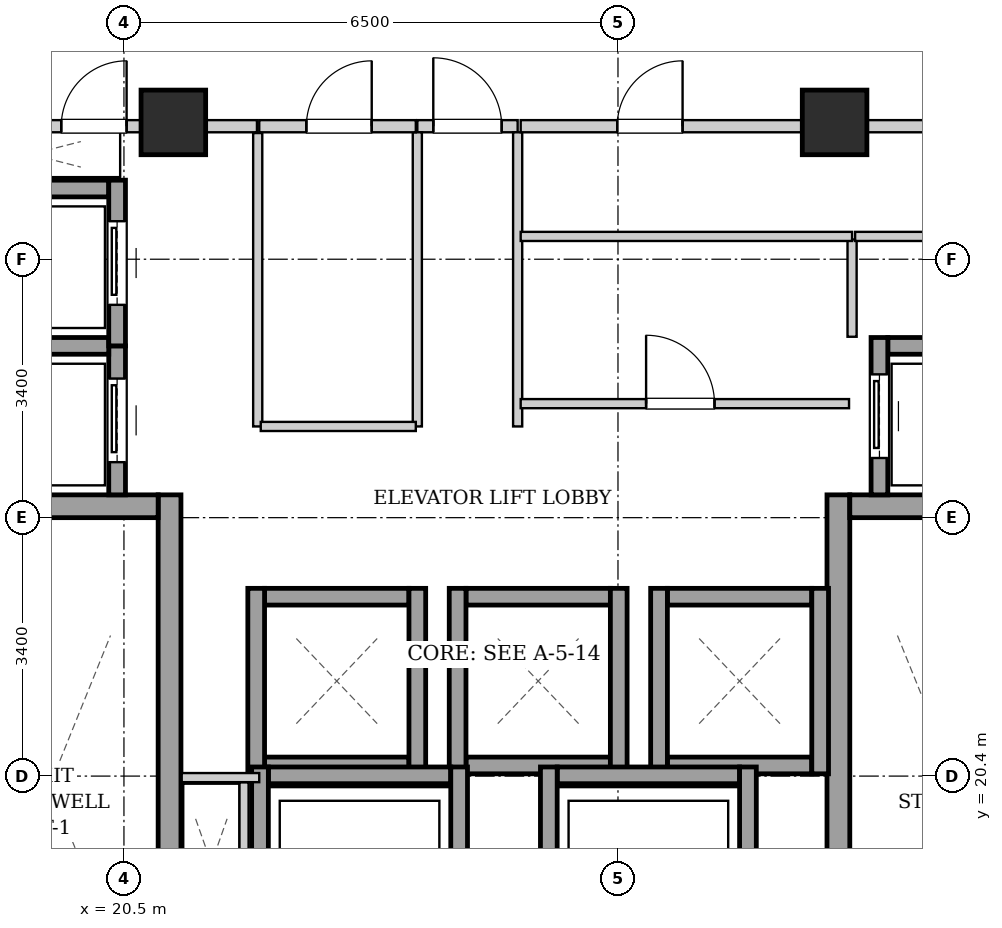
"""IFC4 building model, lengths in metres.
Left out: names, types, materials, properties, quantities, classifications, styles, units other than length and angle.
Written with IfcOpenShell. Run it as: python <this file> out.ifc"""

import sys

from ifc_helpers import new_model, si_unit, direction, frame, frame_2d, origin, origin_2d, place, context, subcontext, project, spatial, rectangle, extrude, element, fill, save


model = new_model("IFC4")
c1 = context("Model", 3, precision=1e-05, world=origin(), true_north=direction((0.0, 1.0)))
c2 = subcontext(c1, "Body", "Model", "MODEL_VIEW")
j1 = project(units=[si_unit("LENGTHUNIT", "METRE"), si_unit("PLANEANGLEUNIT", "RADIAN")], contexts=[c1])
p1 = place(None, origin())
s1 = spatial("IfcSite", under=j1, at=p1, CompositionType="ELEMENT")
p2 = place(p1, origin())
s2 = spatial("IfcBuilding", under=s1, at=p2, CompositionType="ELEMENT")
p3 = place(p2, frame((0.0, 0.0, 177.7)))
s3 = spatial("IfcBuildingStorey", under=s2, at=p3, CompositionType="ELEMENT", Elevation=177.7)
for number, where, z_axis, x_axis in (
    (1, (21.15, 29.0, 0.0), (0.0, 0.0, 1.0), (1.0, 0.0, 0.0)),
    (2, (29.85, 29.0, 0.0), (0.0, 0.0, 1.0), (1.0, 0.0, 0.0)),
):
    element("IfcColumn", number, at=place(p3, frame(where, z_axis=z_axis, x_axis=x_axis)), inside=s3, PredefinedType="COLUMN", context=c2, shape_type="SweptSolid", body=[
        extrude(rectangle(XDim=0.85, YDim=0.85, at=origin_2d()), origin(), (0.0, 0.0, 1.0), 3.3),
    ])
p4 = place(p3, frame((21.1, 15.1, 0.0), z_axis=(0.0, 0.0, 1.0), x_axis=(0.0, 1.0, 0.0)))
e3 = element("IfcWall", 3, at=p4, inside=s3, PredefinedType="SHEAR", context=c2, shape_type="SweptSolid", body=[
    extrude(rectangle(XDim=9.0, YDim=0.3, at=frame_2d((4.5, 0.0))), origin(), (0.0, 0.0, 1.0), 3.04),
])
p5 = place(p3, frame((18.1, 23.95, 0.0), z_axis=(0.0, 0.0, 1.0), x_axis=(1.0, 0.0, 0.0)))
e4 = element("IfcWall", 4, at=p5, inside=s3, PredefinedType="SHEAR", context=c2, shape_type="SweptSolid", body=[
    extrude(rectangle(XDim=2.85, YDim=0.3, at=frame_2d((1.425, 0.0))), origin(), (0.0, 0.0, 1.0), 3.04),
])
p6 = place(p3, frame((29.9, 15.1, 0.0), z_axis=(0.0, 0.0, 1.0), x_axis=(0.0, 1.0, 0.0)))
e5 = element("IfcWall", 5, at=p6, inside=s3, PredefinedType="SHEAR", context=c2, shape_type="SweptSolid", body=[
    extrude(rectangle(XDim=9.0, YDim=0.3, at=frame_2d((4.5, 0.0))), origin(), (0.0, 0.0, 1.0), 3.04),
])
p7 = place(p3, frame((30.05, 23.95, 0.0), z_axis=(0.0, 0.0, 1.0), x_axis=(1.0, 0.0, 0.0)))
e6 = element("IfcWall", 6, at=p7, inside=s3, PredefinedType="SHEAR", context=c2, shape_type="SweptSolid", body=[
    extrude(rectangle(XDim=2.85, YDim=0.3, at=frame_2d((1.425, 0.0))), origin(), (0.0, 0.0, 1.0), 3.04),
])
for number, where, z_axis, x_axis in (
    (7, (22.35, 20.54, 0.0), (0.0, 0.0, 1.0), (1.0, 0.0, 0.0)),
    (8, (22.35, 22.76, 0.0), (0.0, 0.0, 1.0), (1.0, 0.0, 0.0)),
):
    element("IfcWall", number, at=place(p3, frame(where, z_axis=z_axis, x_axis=x_axis)), inside=s3, PredefinedType="SHEAR", context=c2, shape_type="SweptSolid", body=[
        extrude(rectangle(XDim=1.9, YDim=0.22, at=frame_2d((0.95, 0.0))), origin(), (0.0, 0.0, 1.0), 3.04),
    ])
for number, where, z_axis, x_axis in (
    (9, (22.24, 20.43, 0.0), (0.0, 0.0, 1.0), (0.0, 1.0, 0.0)),
    (10, (24.36, 20.43, 0.0), (0.0, 0.0, 1.0), (0.0, 1.0, 0.0)),
):
    element("IfcWall", number, at=place(p3, frame(where, z_axis=z_axis, x_axis=x_axis)), inside=s3, PredefinedType="SHEAR", context=c2, shape_type="SweptSolid", body=[
        extrude(rectangle(XDim=2.44, YDim=0.22, at=frame_2d((1.22, 0.0))), origin(), (0.0, 0.0, 1.0), 3.04),
    ])
for number, where, z_axis, x_axis in (
    (11, (25.0, 20.54, 0.0), (0.0, 0.0, 1.0), (1.0, 0.0, 0.0)),
    (12, (25.0, 22.76, 0.0), (0.0, 0.0, 1.0), (1.0, 0.0, 0.0)),
):
    element("IfcWall", number, at=place(p3, frame(where, z_axis=z_axis, x_axis=x_axis)), inside=s3, PredefinedType="SHEAR", context=c2, shape_type="SweptSolid", body=[
        extrude(rectangle(XDim=1.9, YDim=0.22, at=frame_2d((0.95, 0.0))), origin(), (0.0, 0.0, 1.0), 3.04),
    ])
for number, where, z_axis, x_axis in (
    (13, (24.89, 20.43, 0.0), (0.0, 0.0, 1.0), (0.0, 1.0, 0.0)),
    (14, (27.01, 20.43, 0.0), (0.0, 0.0, 1.0), (0.0, 1.0, 0.0)),
):
    element("IfcWall", number, at=place(p3, frame(where, z_axis=z_axis, x_axis=x_axis)), inside=s3, PredefinedType="SHEAR", context=c2, shape_type="SweptSolid", body=[
        extrude(rectangle(XDim=2.44, YDim=0.22, at=frame_2d((1.22, 0.0))), origin(), (0.0, 0.0, 1.0), 3.04),
    ])
for number, where, z_axis, x_axis in (
    (15, (27.65, 20.54, 0.0), (0.0, 0.0, 1.0), (1.0, 0.0, 0.0)),
    (16, (27.65, 22.76, 0.0), (0.0, 0.0, 1.0), (1.0, 0.0, 0.0)),
):
    element("IfcWall", number, at=place(p3, frame(where, z_axis=z_axis, x_axis=x_axis)), inside=s3, PredefinedType="SHEAR", context=c2, shape_type="SweptSolid", body=[
        extrude(rectangle(XDim=1.9, YDim=0.22, at=frame_2d((0.95, 0.0))), origin(), (0.0, 0.0, 1.0), 3.04),
    ])
for number, where, z_axis, x_axis in (
    (17, (27.54, 20.43, 0.0), (0.0, 0.0, 1.0), (0.0, 1.0, 0.0)),
    (18, (29.66, 20.43, 0.0), (0.0, 0.0, 1.0), (0.0, 1.0, 0.0)),
):
    element("IfcWall", number, at=place(p3, frame(where, z_axis=z_axis, x_axis=x_axis)), inside=s3, PredefinedType="SHEAR", context=c2, shape_type="SweptSolid", body=[
        extrude(rectangle(XDim=2.44, YDim=0.22, at=frame_2d((1.22, 0.0))), origin(), (0.0, 0.0, 1.0), 3.04),
    ])
p8 = place(p3, frame((20.41, 24.1, 0.0), z_axis=(0.0, 0.0, 1.0), x_axis=(0.0, 1.0, 0.0)))
e19 = element("IfcWall", 19, at=p8, inside=s3, PredefinedType="SHEAR", context=c2, shape_type="SweptSolid", body=[
    extrude(rectangle(XDim=1.96, YDim=0.22, at=frame_2d((0.98, 0.0))), origin(), (0.0, 0.0, 1.0), 3.04),
])
p9 = place(p8, frame((0.43, 0.0, 0.0)))
e20 = element("IfcOpeningElement", 20, at=p9, cuts=e19, PredefinedType="OPENING", context=c2, shape_type="SweptSolid", body=[
    extrude(rectangle(XDim=1.1, YDim=2.15, at=frame_2d((0.55, 1.075))), frame((0.0, 0.12, 0.0), z_axis=(0.0, -1.0, 0.0), x_axis=(1.0, 0.0, 0.0)), (0.0, 0.0, 1.0), 0.24),
])
for number, where, z_axis, x_axis in (
    (21, (18.4, 26.06, 0.0), (0.0, 0.0, 1.0), (1.0, 0.0, 0.0)),
    (22, (18.4, 28.13, 0.0), (0.0, 0.0, 1.0), (1.0, 0.0, 0.0)),
):
    element("IfcWall", number, at=place(p3, frame(where, z_axis=z_axis, x_axis=x_axis)), inside=s3, PredefinedType="SHEAR", context=c2, shape_type="SweptSolid", body=[
        extrude(rectangle(XDim=1.9, YDim=0.22, at=frame_2d((0.95, 0.0))), origin(), (0.0, 0.0, 1.0), 3.04),
    ])
p10 = place(p3, frame((20.41, 26.06, 0.0), z_axis=(0.0, 0.0, 1.0), x_axis=(0.0, 1.0, 0.0)))
e23 = element("IfcWall", 23, at=p10, inside=s3, PredefinedType="SHEAR", context=c2, shape_type="SweptSolid", body=[
    extrude(rectangle(XDim=2.18, YDim=0.22, at=frame_2d((1.09, 0.0))), origin(), (0.0, 0.0, 1.0), 3.04),
])
p11 = place(p10, frame((0.54, 0.0, 0.0)))
e24 = element("IfcOpeningElement", 24, at=p11, cuts=e23, PredefinedType="OPENING", context=c2, shape_type="SweptSolid", body=[
    extrude(rectangle(XDim=1.1, YDim=2.15, at=frame_2d((0.55, 1.075))), frame((0.0, 0.12, 0.0), z_axis=(0.0, -1.0, 0.0), x_axis=(1.0, 0.0, 0.0)), (0.0, 0.0, 1.0), 0.24),
])
p12 = place(p3, frame((30.55, 26.06, 0.0), z_axis=(0.0, 0.0, 1.0), x_axis=(1.0, 0.0, 0.0)))
e25 = element("IfcWall", 25, at=p12, inside=s3, PredefinedType="SHEAR", context=c2, shape_type="SweptSolid", body=[
    extrude(rectangle(XDim=1.9, YDim=0.22, at=frame_2d((0.95, 0.0))), origin(), (0.0, 0.0, 1.0), 3.04),
])
p13 = place(p3, frame((30.44, 24.1, 0.0), z_axis=(0.0, 0.0, 1.0), x_axis=(0.0, 1.0, 0.0)))
e26 = element("IfcWall", 26, at=p13, inside=s3, PredefinedType="SHEAR", context=c2, shape_type="SweptSolid", body=[
    extrude(rectangle(XDim=2.07, YDim=0.22, at=frame_2d((1.035, 0.0))), origin(), (0.0, 0.0, 1.0), 3.04),
])
p14 = place(p13, frame((0.485, 0.0, 0.0)))
e27 = element("IfcOpeningElement", 27, at=p14, cuts=e26, PredefinedType="OPENING", context=c2, shape_type="SweptSolid", body=[
    extrude(rectangle(XDim=1.1, YDim=2.15, at=frame_2d((0.55, 1.075))), frame((0.0, 0.12, 0.0), z_axis=(0.0, -1.0, 0.0), x_axis=(1.0, 0.0, 0.0)), (0.0, 0.0, 1.0), 0.24),
])
p15 = place(p3, frame((22.4, 20.41, 0.0), z_axis=(0.0, 0.0, 1.0), x_axis=(1.0, 0.0, 0.0)))
e28 = element("IfcWall", 28, at=p15, inside=s3, PredefinedType="SHEAR", context=c2, shape_type="SweptSolid", body=[
    extrude(rectangle(XDim=2.4, YDim=0.22, at=frame_2d((1.2, 0.0))), origin(), (0.0, 0.0, 1.0), 3.04),
])
for number, where, z_axis, x_axis in (
    (29, (22.29, 17.98, 0.0), (0.0, 0.0, 1.0), (0.0, 1.0, 0.0)),
    (30, (24.91, 17.98, 0.0), (0.0, 0.0, 1.0), (0.0, 1.0, 0.0)),
):
    element("IfcWall", number, at=place(p3, frame(where, z_axis=z_axis, x_axis=x_axis)), inside=s3, PredefinedType="SHEAR", context=c2, shape_type="SweptSolid", body=[
        extrude(rectangle(XDim=2.54, YDim=0.22, at=frame_2d((1.27, 0.0))), origin(), (0.0, 0.0, 1.0), 3.04),
    ])
p16 = place(p3, frame((26.2, 20.41, 0.0), z_axis=(0.0, 0.0, 1.0), x_axis=(1.0, 0.0, 0.0)))
e31 = element("IfcWall", 31, at=p16, inside=s3, PredefinedType="SHEAR", context=c2, shape_type="SweptSolid", body=[
    extrude(rectangle(XDim=2.4, YDim=0.22, at=frame_2d((1.2, 0.0))), origin(), (0.0, 0.0, 1.0), 3.04),
])
for number, where, z_axis, x_axis in (
    (32, (26.09, 17.98, 0.0), (0.0, 0.0, 1.0), (0.0, 1.0, 0.0)),
    (33, (28.71, 17.98, 0.0), (0.0, 0.0, 1.0), (0.0, 1.0, 0.0)),
):
    element("IfcWall", number, at=place(p3, frame(where, z_axis=z_axis, x_axis=x_axis)), inside=s3, PredefinedType="SHEAR", context=c2, shape_type="SweptSolid", body=[
        extrude(rectangle(XDim=2.54, YDim=0.22, at=frame_2d((1.27, 0.0))), origin(), (0.0, 0.0, 1.0), 3.04),
    ])
p17 = place(p3, frame((24.36, 28.95, 0.0), z_axis=(0.0, 0.0, 1.0), x_axis=(1.0, 0.0, 0.0)))
e34 = element("IfcWall", 34, at=p17, inside=s3, PredefinedType="PARTITIONING", context=c2, shape_type="SweptSolid", body=[
    extrude(rectangle(XDim=1.32, YDim=0.16, at=frame_2d((0.66, 0.0))), origin(), (0.0, 0.0, 1.0), 2.556),
])
p18 = place(p17, frame((0.21, 0.0, 0.0)))
e35 = element("IfcOpeningElement", 35, at=p18, cuts=e34, PredefinedType="OPENING", context=c2, shape_type="SweptSolid", body=[
    extrude(rectangle(XDim=0.9, YDim=2.05, at=frame_2d((0.45, 1.025))), frame((0.0, 0.09, 0.0), z_axis=(0.0, -1.0, 0.0), x_axis=(1.0, 0.0, 0.0)), (0.0, 0.0, 1.0), 0.18),
])
p19 = place(p3, frame((17.96, 28.95, 0.0), z_axis=(0.0, 0.0, 1.0), x_axis=(1.0, 0.0, 0.0)))
e36 = element("IfcWall", 36, at=p19, inside=s3, PredefinedType="PARTITIONING", context=c2, shape_type="SweptSolid", body=[
    extrude(rectangle(XDim=4.29, YDim=0.16, at=frame_2d((2.145, 0.0))), origin(), (0.0, 0.0, 1.0), 2.556),
])
p20 = place(p19, frame((1.715, 0.0, 0.0)))
e37 = element("IfcOpeningElement", 37, at=p20, cuts=e36, PredefinedType="OPENING", context=c2, shape_type="SweptSolid", body=[
    extrude(rectangle(XDim=0.86, YDim=2.05, at=frame_2d((0.43, 1.025))), frame((0.0, 0.09, 0.0), z_axis=(0.0, -1.0, 0.0), x_axis=(1.0, 0.0, 0.0)), (0.0, 0.0, 1.0), 0.18),
])
p21 = place(p3, frame((22.08, 18.2, 0.0), z_axis=(0.0, 0.0, 1.0), x_axis=(0.0, 1.0, 0.0)))
e38 = element("IfcWall", 38, at=p21, inside=s3, PredefinedType="PARTITIONING", context=c2, shape_type="SweptSolid", body=[
    extrude(rectangle(XDim=2.12, YDim=0.12, at=frame_2d((1.06, 0.0))), origin(), (0.0, 0.0, 1.0), 3.04),
])
p22 = place(p3, frame((22.28, 20.38, 0.0), z_axis=(0.0, 0.0, 1.0), x_axis=(-1.0, 0.0, 0.0)))
e39 = element("IfcWall", 39, at=p22, inside=s3, PredefinedType="PARTITIONING", context=c2, shape_type="SweptSolid", body=[
    extrude(rectangle(XDim=1.02, YDim=0.12, at=frame_2d((0.51, 0.0))), origin(), (0.0, 0.0, 1.0), 3.04),
])
for number, where, z_axis, x_axis in (
    (40, (24.36, 25.0, 0.0), (0.0, 0.0, 1.0), (0.0, 1.0, 0.0)),
    (41, (25.68, 25.0, 0.0), (0.0, 0.0, 1.0), (0.0, 1.0, 0.0)),
):
    element("IfcWall", number, at=place(p3, frame(where, z_axis=z_axis, x_axis=x_axis)), inside=s3, PredefinedType="PARTITIONING", context=c2, shape_type="SweptSolid", body=[
        extrude(rectangle(XDim=3.87, YDim=0.12, at=frame_2d((1.935, 0.0))), origin(), (0.0, 0.0, 1.0), 3.04),
    ])
p23 = place(p3, frame((30.08, 26.18, 0.0), z_axis=(0.0, 0.0, 1.0), x_axis=(0.0, 1.0, 0.0)))
e42 = element("IfcWall", 42, at=p23, inside=s3, PredefinedType="PARTITIONING", context=c2, shape_type="SweptSolid", body=[
    extrude(rectangle(XDim=1.28, YDim=0.12, at=frame_2d((0.64, 0.0))), origin(), (0.0, 0.0, 1.0), 3.04),
])
p24 = place(p3, frame((30.12, 27.5, 0.0), z_axis=(0.0, 0.0, 1.0), x_axis=(1.0, 0.0, 0.0)))
e43 = element("IfcWall", 43, at=p24, inside=s3, PredefinedType="PARTITIONING", context=c2, shape_type="SweptSolid", body=[
    extrude(rectangle(XDim=2.92, YDim=0.12, at=frame_2d((1.46, 0.0))), origin(), (0.0, 0.0, 1.0), 3.04),
])
p25 = place(p24, frame((0.97, 0.0, 0.0)))
e44 = element("IfcOpeningElement", 44, at=p25, cuts=e43, PredefinedType="OPENING", context=c2, shape_type="SweptSolid", body=[
    extrude(rectangle(XDim=0.86, YDim=2.05, at=frame_2d((0.43, 1.025))), frame((0.0, 0.07, 0.0), z_axis=(0.0, -1.0, 0.0), x_axis=(1.0, 0.0, 0.0)), (0.0, 0.0, 1.0), 0.14),
])
p26 = place(p3, frame((22.26, 25.0, 0.0), z_axis=(0.0, 0.0, 1.0), x_axis=(0.0, 1.0, 0.0)))
e45 = element("IfcWall", 45, at=p26, inside=s3, PredefinedType="PARTITIONING", context=c2, shape_type="SweptSolid", body=[
    extrude(rectangle(XDim=3.86, YDim=0.12, at=frame_2d((1.93, 0.0))), origin(), (0.0, 0.0, 1.0), 3.04),
])
p27 = place(p3, frame((22.3, 25.0, 0.0), z_axis=(0.0, 0.0, 1.0), x_axis=(1.0, 0.0, 0.0)))
e46 = element("IfcWall", 46, at=p27, inside=s3, PredefinedType="PARTITIONING", context=c2, shape_type="SweptSolid", body=[
    extrude(rectangle(XDim=2.04, YDim=0.12, at=frame_2d((1.02, 0.0))), origin(), (0.0, 0.0, 1.0), 3.04),
])
p28 = place(p3, frame((22.28, 28.95, 0.0), z_axis=(0.0, 0.0, 1.0), x_axis=(1.0, 0.0, 0.0)))
e47 = element("IfcWall", 47, at=p28, inside=s3, PredefinedType="PARTITIONING", context=c2, shape_type="SweptSolid", body=[
    extrude(rectangle(XDim=2.06, YDim=0.16, at=frame_2d((1.03, 0.0))), origin(), (0.0, 0.0, 1.0), 2.556),
])
p29 = place(p28, frame((0.62, 0.0, 0.0)))
e48 = element("IfcOpeningElement", 48, at=p29, cuts=e47, PredefinedType="OPENING", context=c2, shape_type="SweptSolid", body=[
    extrude(rectangle(XDim=0.86, YDim=2.05, at=frame_2d((0.43, 1.025))), frame((0.0, 0.09, 0.0), z_axis=(0.0, -1.0, 0.0), x_axis=(1.0, 0.0, 0.0)), (0.0, 0.0, 1.0), 0.18),
])
p30 = place(p3, frame((25.72, 27.5, 0.0), z_axis=(0.0, 0.0, 1.0), x_axis=(1.0, 0.0, 0.0)))
e49 = element("IfcWall", 49, at=p30, inside=s3, PredefinedType="PARTITIONING", context=c2, shape_type="SweptSolid", body=[
    extrude(rectangle(XDim=4.36, YDim=0.12, at=frame_2d((2.18, 0.0))), origin(), (0.0, 0.0, 1.0), 3.04),
])
p31 = place(p3, frame((25.72, 25.3, 0.0), z_axis=(0.0, 0.0, 1.0), x_axis=(1.0, 0.0, 0.0)))
e50 = element("IfcWall", 50, at=p31, inside=s3, PredefinedType="PARTITIONING", context=c2, shape_type="SweptSolid", body=[
    extrude(rectangle(XDim=4.32, YDim=0.12, at=frame_2d((2.16, 0.0))), origin(), (0.0, 0.0, 1.0), 3.04),
])
p32 = place(p31, frame((1.65, 0.0, 0.0)))
e51 = element("IfcOpeningElement", 51, at=p32, cuts=e50, PredefinedType="OPENING", context=c2, shape_type="SweptSolid", body=[
    extrude(rectangle(XDim=0.9, YDim=2.05, at=frame_2d((0.45, 1.025))), frame((0.0, 0.07, 0.0), z_axis=(0.0, -1.0, 0.0), x_axis=(1.0, 0.0, 0.0)), (0.0, 0.0, 1.0), 0.14),
])
p33 = place(p3, frame((25.72, 28.95, 0.0), z_axis=(0.0, 0.0, 1.0), x_axis=(1.0, 0.0, 0.0)))
e52 = element("IfcWall", 52, at=p33, inside=s3, PredefinedType="PARTITIONING", context=c2, shape_type="SweptSolid", body=[
    extrude(rectangle(XDim=7.32, YDim=0.16, at=frame_2d((3.66, 0.0))), origin(), (0.0, 0.0, 1.0), 2.556),
])
p34 = place(p33, frame((1.27, 0.0, 0.0)))
e53 = element("IfcOpeningElement", 53, at=p34, cuts=e52, PredefinedType="OPENING", context=c2, shape_type="SweptSolid", body=[
    extrude(rectangle(XDim=0.86, YDim=2.05, at=frame_2d((0.43, 1.025))), frame((0.0, 0.09, 0.0), z_axis=(0.0, -1.0, 0.0), x_axis=(1.0, 0.0, 0.0)), (0.0, 0.0, 1.0), 0.18),
])
p35 = place(p9, origin())
e54 = element("IfcDoor", 54, at=p35, inside=s3, OperationType="SLIDING_TO_LEFT", PredefinedType="DOOR", context=c2, shape_type="SweptSolid", body=[
    extrude(rectangle(XDim=1.1, YDim=2.15, at=frame_2d((0.55, 1.075))), frame((0.0, 0.025, 0.0), z_axis=(0.0, -1.0, 0.0), x_axis=(1.0, 0.0, 0.0)), (0.0, 0.0, 1.0), 0.05),
])
fill(e20, e54)
p36 = place(p11, origin())
e55 = element("IfcDoor", 55, at=p36, inside=s3, OperationType="SLIDING_TO_LEFT", PredefinedType="DOOR", context=c2, shape_type="SweptSolid", body=[
    extrude(rectangle(XDim=1.1, YDim=2.15, at=frame_2d((0.55, 1.075))), frame((0.0, 0.025, 0.0), z_axis=(0.0, -1.0, 0.0), x_axis=(1.0, 0.0, 0.0)), (0.0, 0.0, 1.0), 0.05),
])
fill(e24, e55)
p37 = place(p14, origin())
e56 = element("IfcDoor", 56, at=p37, inside=s3, OperationType="SLIDING_TO_LEFT", PredefinedType="DOOR", context=c2, shape_type="SweptSolid", body=[
    extrude(rectangle(XDim=1.1, YDim=2.15, at=frame_2d((0.55, 1.075))), frame((0.0, 0.025, 0.0), z_axis=(0.0, -1.0, 0.0), x_axis=(1.0, 0.0, 0.0)), (0.0, 0.0, 1.0), 0.05),
])
fill(e27, e56)
p38 = place(p18, origin())
e57 = element("IfcDoor", 57, at=p38, inside=s3, OperationType="SINGLE_SWING_LEFT", PredefinedType="DOOR", context=c2, shape_type="SweptSolid", body=[
    extrude(rectangle(XDim=0.9, YDim=2.05, at=frame_2d((0.45, 1.025))), frame((0.0, 0.025, 0.0), z_axis=(0.0, -1.0, 0.0), x_axis=(1.0, 0.0, 0.0)), (0.0, 0.0, 1.0), 0.05),
])
fill(e35, e57)
p39 = place(p20, origin())
e58 = element("IfcDoor", 58, at=p39, inside=s3, OperationType="SINGLE_SWING_RIGHT", PredefinedType="DOOR", context=c2, shape_type="SweptSolid", body=[
    extrude(rectangle(XDim=0.86, YDim=2.05, at=frame_2d((0.43, 1.025))), frame((0.0, 0.025, 0.0), z_axis=(0.0, -1.0, 0.0), x_axis=(1.0, 0.0, 0.0)), (0.0, 0.0, 1.0), 0.05),
])
fill(e37, e58)
p40 = place(p29, origin())
e59 = element("IfcDoor", 59, at=p40, inside=s3, OperationType="SINGLE_SWING_RIGHT", PredefinedType="DOOR", context=c2, shape_type="SweptSolid", body=[
    extrude(rectangle(XDim=0.86, YDim=2.05, at=frame_2d((0.43, 1.025))), frame((0.0, 0.025, 0.0), z_axis=(0.0, -1.0, 0.0), x_axis=(1.0, 0.0, 0.0)), (0.0, 0.0, 1.0), 0.05),
])
fill(e48, e59)
p41 = place(p32, origin())
e60 = element("IfcDoor", 60, at=p41, inside=s3, OperationType="SINGLE_SWING_LEFT", PredefinedType="DOOR", context=c2, shape_type="SweptSolid", body=[
    extrude(rectangle(XDim=0.9, YDim=2.05, at=frame_2d((0.45, 1.025))), frame((0.0, 0.025, 0.0), z_axis=(0.0, -1.0, 0.0), x_axis=(1.0, 0.0, 0.0)), (0.0, 0.0, 1.0), 0.05),
])
fill(e51, e60)
p42 = place(p34, origin())
e61 = element("IfcDoor", 61, at=p42, inside=s3, OperationType="SINGLE_SWING_RIGHT", PredefinedType="DOOR", context=c2, shape_type="SweptSolid", body=[
    extrude(rectangle(XDim=0.86, YDim=2.05, at=frame_2d((0.43, 1.025))), frame((0.0, 0.025, 0.0), z_axis=(0.0, -1.0, 0.0), x_axis=(1.0, 0.0, 0.0)), (0.0, 0.0, 1.0), 0.05),
])
fill(e53, e61)
save(model, sys.argv[1])
